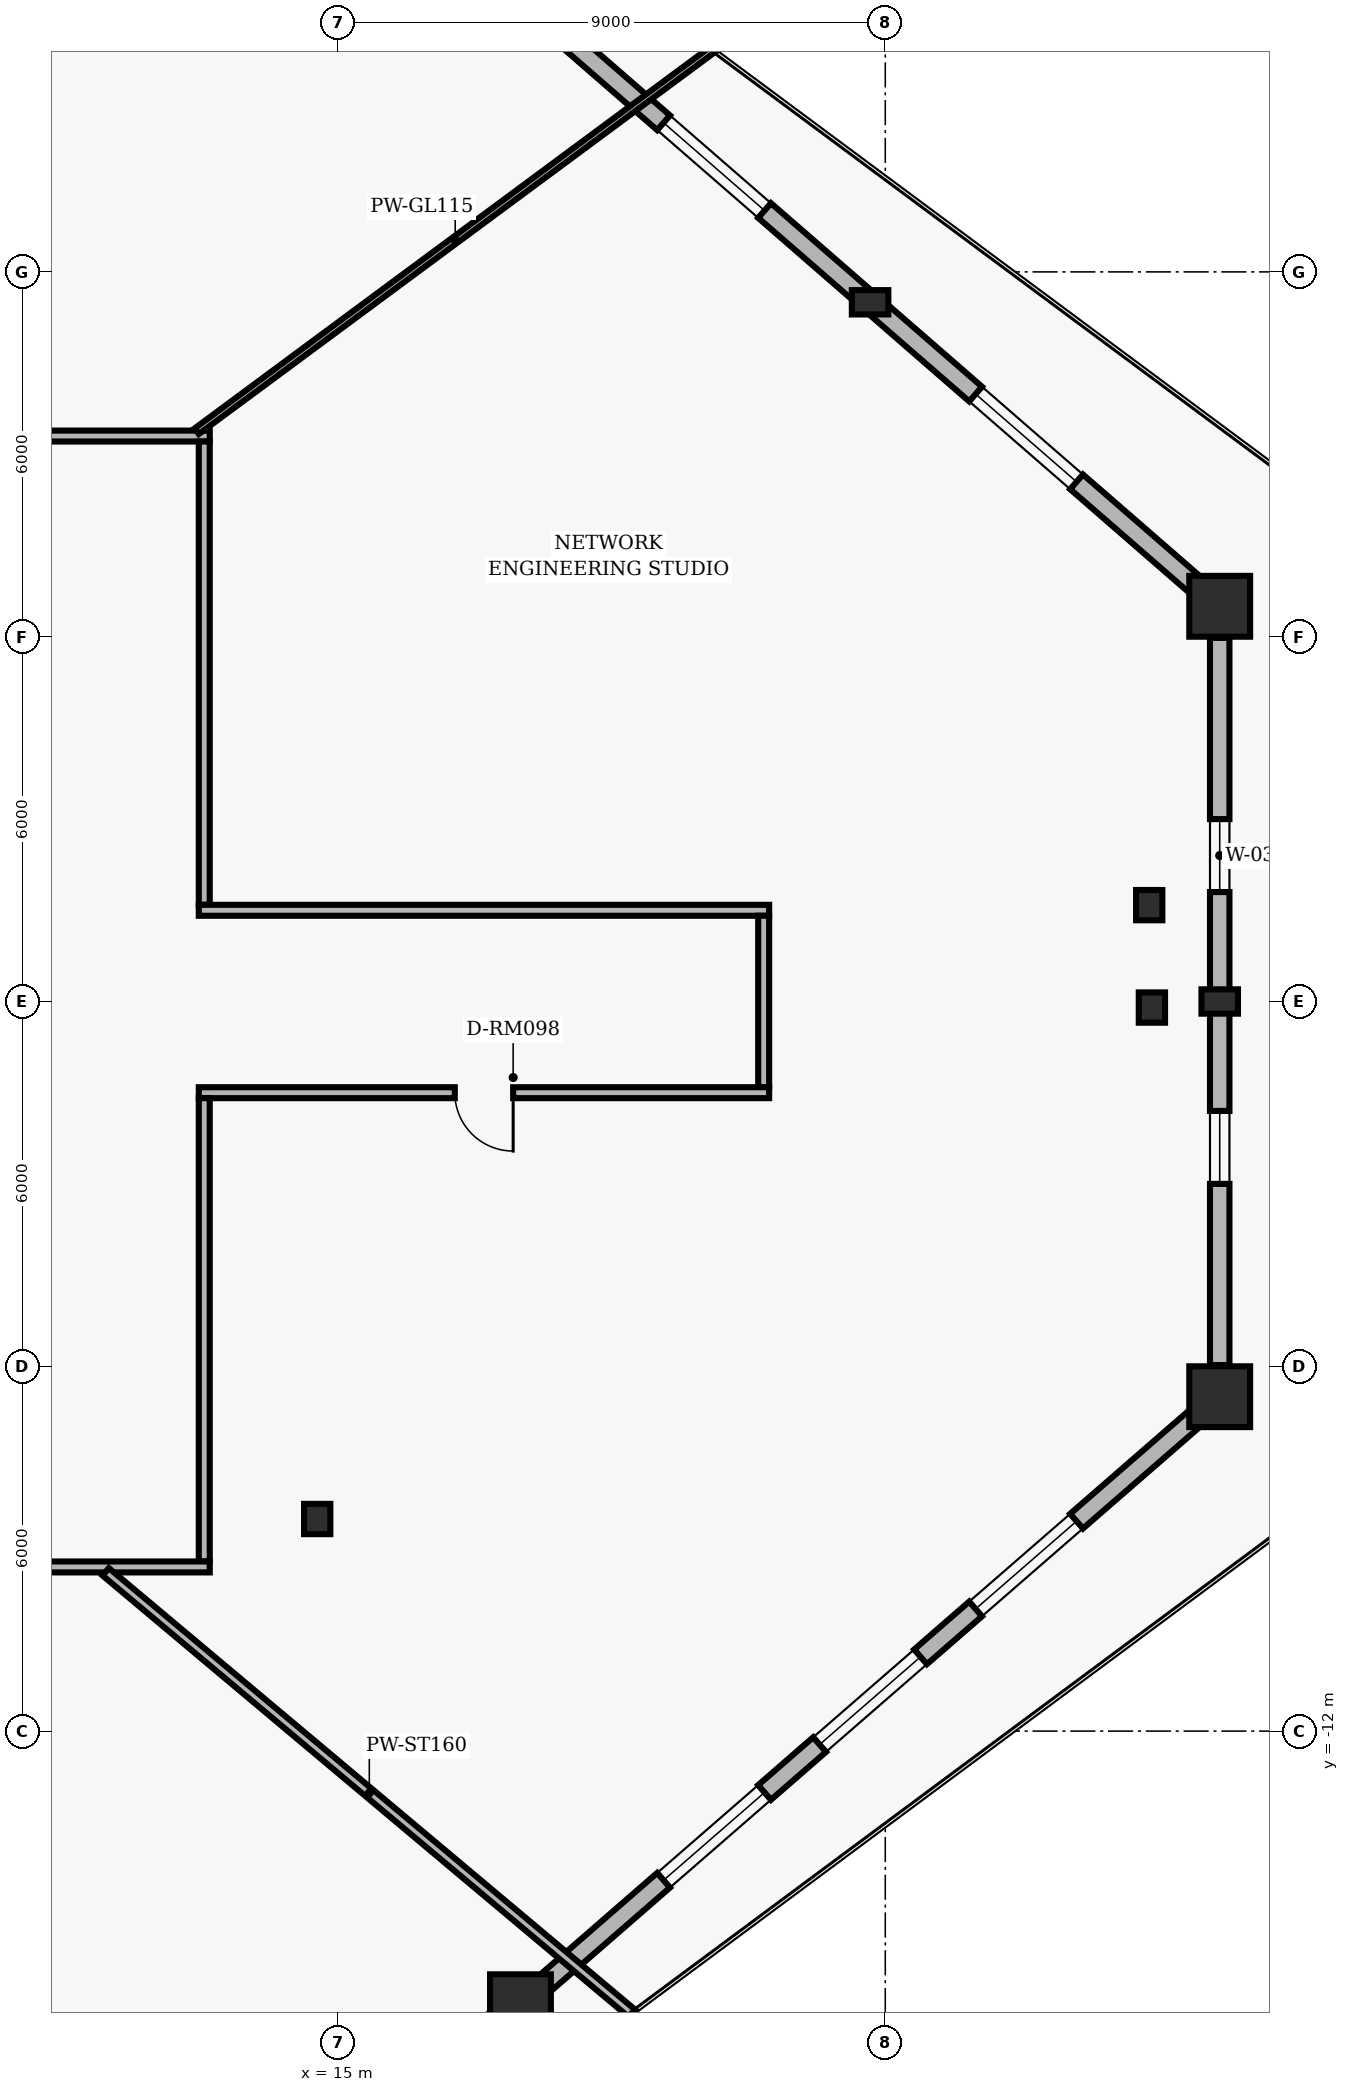
"""IFC4 building model, lengths in metres.
Left out: names, types, materials, properties, quantities, classifications, styles, units other than length and angle.
Written with IfcOpenShell. Run it as: python <this file> out.ifc"""

import sys

from ifc_helpers import new_model, si_unit, direction, frame, frame_2d, origin, origin_2d, place, context, subcontext, project, spatial, rectangle, i_section, extrude, element, fill, save


model = new_model("IFC4")
c1 = context("Model", 3, precision=1e-05, world=origin(), true_north=direction((0.0, 1.0)))
c2 = subcontext(c1, "Body", "Model", "MODEL_VIEW")
j1 = project(units=[si_unit("LENGTHUNIT", "METRE"), si_unit("PLANEANGLEUNIT", "RADIAN")], contexts=[c1])
p1 = place(None, origin())
s1 = spatial("IfcSite", under=j1, at=p1, CompositionType="ELEMENT")
p2 = place(p1, origin())
s2 = spatial("IfcBuilding", under=s1, at=p2, CompositionType="ELEMENT")
p3 = place(p2, frame((0.0, 0.0, 8.32)))
s3 = spatial("IfcBuildingStorey", under=s2, at=p3, CompositionType="ELEMENT", Elevation=8.32)
for number, where, z_axis, x_axis in (
    (1, (18.0, -16.5, 0.0), (0.0, 0.0, 1.0), (1.0, 0.0, 0.0)),
    (2, (29.5, -6.5, 0.0), (0.0, 0.0, 1.0), (1.0, 0.0, 0.0)),
    (3, (29.5, 6.5, 0.0), (0.0, 0.0, 1.0), (1.0, 0.0, 0.0)),
):
    element("IfcColumn", number, at=place(p3, frame(where, z_axis=z_axis, x_axis=x_axis)), inside=s3, PredefinedType="COLUMN", context=c2, shape_type="SweptSolid", body=[
        extrude(rectangle(XDim=1.0, YDim=1.0, at=origin_2d()), origin(), (0.0, 0.0, 1.0), 3.52),
    ])
for number, where, z_axis, x_axis in (
    (4, (28.341, 1.585, 0.0), (0.0, 0.0, 1.0), (1.0, 0.0, 0.0)),
    (5, (14.657, -8.512, 0.0), (0.0, 0.0, 1.0), (1.0, 0.0, 0.0)),
    (6, (28.385, -0.1, 0.0), (0.0, 0.0, 1.0), (1.0, 0.0, 0.0)),
):
    element("IfcColumn", number, at=place(p3, frame(where, z_axis=z_axis, x_axis=x_axis)), inside=s3, PredefinedType="COLUMN", context=c2, shape_type="SweptSolid", body=[
        extrude(i_section(OverallWidth=0.432, OverallDepth=0.498, WebThickness=0.056, FlangeThickness=0.089, FilletRadius=0.025, at=origin_2d()), origin(), (0.0, 0.0, 1.0), 3.52),
    ])
for number, where, z_axis, x_axis in (
    (7, (29.5, 0.0, 0.0), (0.0, 0.0, 1.0), (1.0, 0.0, 0.0)),
    (8, (23.75, 11.5, 0.0), (0.0, 0.0, 1.0), (1.0, 0.0, 0.0)),
):
    element("IfcColumn", number, at=place(p3, frame(where, z_axis=z_axis, x_axis=x_axis)), inside=s3, PredefinedType="PILASTER", context=c2, shape_type="SweptSolid", body=[
        extrude(rectangle(XDim=0.6, YDim=0.4, at=origin_2d()), origin(), (0.0, 0.0, 1.0), 3.52),
    ])
p4 = place(p3, frame((29.108, -6.841, 0.0), z_axis=(0.0, 0.0, 1.0), x_axis=(-0.754615886195, -0.656166796098, 0.0)))
e9 = element("IfcWall", 9, at=p4, inside=s3, PredefinedType="SOLIDWALL", context=c2, shape_type="SweptSolid", body=[
    extrude(rectangle(XDim=14.2, YDim=0.32, at=frame_2d((7.1, 0.0))), origin(), (0.0, 0.0, 1.0), 2.261),
])
p5 = place(p4, frame((2.6, 0.0, 0.4)))
e10 = element("IfcOpeningElement", 10, at=p5, cuts=e9, PredefinedType="OPENING", context=c2, shape_type="SweptSolid", body=[
    extrude(rectangle(XDim=2.2, YDim=1.1, at=frame_2d((1.1, 0.55))), frame((0.0, 0.17, 0.0), z_axis=(0.0, -1.0, 0.0), x_axis=(1.0, 0.0, 0.0)), (0.0, 0.0, 1.0), 0.34),
])
p6 = place(p4, frame((6.0, 0.0, 0.4)))
e11 = element("IfcOpeningElement", 11, at=p6, cuts=e9, PredefinedType="OPENING", context=c2, shape_type="SweptSolid", body=[
    extrude(rectangle(XDim=2.2, YDim=1.1, at=frame_2d((1.1, 0.55))), frame((0.0, 0.17, 0.0), z_axis=(0.0, -1.0, 0.0), x_axis=(1.0, 0.0, 0.0)), (0.0, 0.0, 1.0), 0.34),
])
p7 = place(p4, frame((9.4, 0.0, 0.4)))
e12 = element("IfcOpeningElement", 12, at=p7, cuts=e9, PredefinedType="OPENING", context=c2, shape_type="SweptSolid", body=[
    extrude(rectangle(XDim=2.2, YDim=1.1, at=frame_2d((1.1, 0.55))), frame((0.0, 0.17, 0.0), z_axis=(0.0, -1.0, 0.0), x_axis=(1.0, 0.0, 0.0)), (0.0, 0.0, 1.0), 0.34),
])
p8 = place(p3, frame((29.5, 5.98, 0.0), z_axis=(0.0, 0.0, 1.0), x_axis=(0.0, -1.0, 0.0)))
e13 = element("IfcWall", 13, at=p8, inside=s3, PredefinedType="SOLIDWALL", context=c2, shape_type="SweptSolid", body=[
    extrude(rectangle(XDim=11.96, YDim=0.32, at=frame_2d((5.98, 0.0))), origin(), (0.0, 0.0, 1.0), 2.588),
])
p9 = place(p8, frame((2.98, 0.0, 0.65)))
e14 = element("IfcOpeningElement", 14, at=p9, cuts=e13, PredefinedType="OPENING", context=c2, shape_type="SweptSolid", body=[
    extrude(rectangle(XDim=1.2, YDim=1.6, at=frame_2d((0.6, 0.8))), frame((0.0, 0.17, 0.0), z_axis=(0.0, -1.0, 0.0), x_axis=(1.0, 0.0, 0.0)), (0.0, 0.0, 1.0), 0.34),
])
p10 = place(p8, frame((7.78, 0.0, 0.65)))
e15 = element("IfcOpeningElement", 15, at=p10, cuts=e13, PredefinedType="OPENING", context=c2, shape_type="SweptSolid", body=[
    extrude(rectangle(XDim=1.2, YDim=1.6, at=frame_2d((0.6, 0.8))), frame((0.0, 0.17, 0.0), z_axis=(0.0, -1.0, 0.0), x_axis=(1.0, 0.0, 0.0)), (0.0, 0.0, 1.0), 0.34),
])
p11 = place(p3, frame((18.392, 16.159, 0.0), z_axis=(0.0, 0.0, 1.0), x_axis=(0.754615886195, -0.656166796098, 0.0)))
e16 = element("IfcWall", 16, at=p11, inside=s3, PredefinedType="SOLIDWALL", context=c2, shape_type="SweptSolid", body=[
    extrude(rectangle(XDim=14.2, YDim=0.32, at=frame_2d((7.1, 0.0))), origin(), (0.0, 0.0, 1.0), 2.261),
])
p12 = place(p11, frame((2.6, 0.0, 0.65)))
e17 = element("IfcOpeningElement", 17, at=p12, cuts=e16, PredefinedType="OPENING", context=c2, shape_type="SweptSolid", body=[
    extrude(rectangle(XDim=2.2, YDim=1.1, at=frame_2d((1.1, 0.55))), frame((0.0, 0.17, 0.0), z_axis=(0.0, -1.0, 0.0), x_axis=(1.0, 0.0, 0.0)), (0.0, 0.0, 1.0), 0.34),
])
p13 = place(p11, frame((9.4, 0.0, 0.65)))
e18 = element("IfcOpeningElement", 18, at=p13, cuts=e16, PredefinedType="OPENING", context=c2, shape_type="SweptSolid", body=[
    extrude(rectangle(XDim=2.2, YDim=1.1, at=frame_2d((1.1, 0.55))), frame((0.0, 0.17, 0.0), z_axis=(0.0, -1.0, 0.0), x_axis=(1.0, 0.0, 0.0)), (0.0, 0.0, 1.0), 0.34),
])
p14 = place(p3, frame((-12.89, 9.3, 0.0), z_axis=(0.0, 0.0, 1.0), x_axis=(1.0, 0.0, 0.0)))
e19 = element("IfcWall", 19, at=p14, inside=s3, PredefinedType="PARTITIONING", context=c2, shape_type="SweptSolid", body=[
    extrude(rectangle(XDim=25.78, YDim=0.18, at=frame_2d((12.89, 0.0))), origin(), (0.0, 0.0, 1.0), 2.76),
])
p15 = place(p14, frame((17.202, 0.0, 0.0)))
e20 = element("IfcOpeningElement", 20, at=p15, cuts=e19, PredefinedType="OPENING", context=c2, shape_type="SweptSolid", body=[
    extrude(rectangle(XDim=0.96, YDim=2.02, at=frame_2d((0.48, 1.01))), frame((0.0, 0.1, 0.0), z_axis=(0.0, -1.0, 0.0), x_axis=(1.0, 0.0, 0.0)), (0.0, 0.0, 1.0), 0.2),
])
p16 = place(p14, frame((4.539, 0.0, 0.0)))
e21 = element("IfcOpeningElement", 21, at=p16, cuts=e19, PredefinedType="OPENING", context=c2, shape_type="SweptSolid", body=[
    extrude(rectangle(XDim=1.02, YDim=2.02, at=frame_2d((0.51, 1.01))), frame((0.0, 0.1, 0.0), z_axis=(0.0, -1.0, 0.0), x_axis=(1.0, 0.0, 0.0)), (0.0, 0.0, 1.0), 0.2),
])
p17 = place(p3, frame((12.8, 9.21, 0.0), z_axis=(0.0, 0.0, 1.0), x_axis=(0.0, -1.0, 0.0)))
e22 = element("IfcWall", 22, at=p17, inside=s3, PredefinedType="PARTITIONING", context=c2, shape_type="SweptSolid", body=[
    extrude(rectangle(XDim=7.62, YDim=0.18, at=frame_2d((3.81, 0.0))), origin(), (0.0, 0.0, 1.0), 3.193),
])
p18 = place(p3, frame((12.71, 1.5, 0.0), z_axis=(0.0, 0.0, 1.0), x_axis=(1.0, 0.0, 0.0)))
e23 = element("IfcWall", 23, at=p18, inside=s3, PredefinedType="PARTITIONING", context=c2, shape_type="SweptSolid", body=[
    extrude(rectangle(XDim=9.38, YDim=0.18, at=frame_2d((4.69, 0.0))), origin(), (0.0, 0.0, 1.0), 3.193),
])
p19 = place(p3, frame((22.0, 1.41, 0.0), z_axis=(0.0, 0.0, 1.0), x_axis=(0.0, -1.0, 0.0)))
e24 = element("IfcWall", 24, at=p19, inside=s3, PredefinedType="PARTITIONING", context=c2, shape_type="SweptSolid", body=[
    extrude(rectangle(XDim=2.82, YDim=0.18, at=frame_2d((1.41, 0.0))), origin(), (0.0, 0.0, 1.0), 3.193),
])
p20 = place(p3, frame((22.09, -1.5, 0.0), z_axis=(0.0, 0.0, 1.0), x_axis=(-1.0, 0.0, 0.0)))
e25 = element("IfcWall", 25, at=p20, inside=s3, PredefinedType="PARTITIONING", context=c2, shape_type="SweptSolid", body=[
    extrude(rectangle(XDim=9.38, YDim=0.18, at=frame_2d((4.69, 0.0))), origin(), (0.0, 0.0, 1.0), 3.193),
])
p21 = place(p20, frame((4.21, 0.0, 0.0)))
e26 = element("IfcOpeningElement", 26, at=p21, cuts=e25, PredefinedType="OPENING", context=c2, shape_type="SweptSolid", body=[
    extrude(rectangle(XDim=0.96, YDim=2.02, at=frame_2d((0.48, 1.01))), frame((0.0, 0.1, 0.0), z_axis=(0.0, -1.0, 0.0), x_axis=(1.0, 0.0, 0.0)), (0.0, 0.0, 1.0), 0.2),
])
p22 = place(p3, frame((12.8, -1.59, 0.0), z_axis=(0.0, 0.0, 1.0), x_axis=(0.0, -1.0, 0.0)))
e27 = element("IfcWall", 27, at=p22, inside=s3, PredefinedType="PARTITIONING", context=c2, shape_type="SweptSolid", body=[
    extrude(rectangle(XDim=7.62, YDim=0.18, at=frame_2d((3.81, 0.0))), origin(), (0.0, 0.0, 1.0), 3.193),
])
p23 = place(p3, frame((12.89, -9.3, 0.0), z_axis=(0.0, 0.0, 1.0), x_axis=(-1.0, 0.0, 0.0)))
e28 = element("IfcWall", 28, at=p23, inside=s3, PredefinedType="PARTITIONING", context=c2, shape_type="SweptSolid", body=[
    extrude(rectangle(XDim=25.78, YDim=0.18, at=frame_2d((12.89, 0.0))), origin(), (0.0, 0.0, 1.0), 2.76),
])
p24 = place(p23, frame((9.254, 0.0, 0.0)))
e29 = element("IfcOpeningElement", 29, at=p24, cuts=e28, PredefinedType="OPENING", context=c2, shape_type="SweptSolid", body=[
    extrude(rectangle(XDim=1.02, YDim=2.02, at=frame_2d((0.51, 1.01))), frame((0.0, 0.1, 0.0), z_axis=(0.0, -1.0, 0.0), x_axis=(1.0, 0.0, 0.0)), (0.0, 0.0, 1.0), 0.2),
])
p25 = place(p3, frame((11.179, -9.38, 0.0), z_axis=(0.0, 0.0, 1.0), x_axis=(0.766037025887, -0.642796449095, 0.0)))
e30 = element("IfcWall", 30, at=p25, inside=s3, PredefinedType="PARTITIONING", context=c2, shape_type="SweptSolid", body=[
    extrude(rectangle(XDim=11.32, YDim=0.16, at=frame_2d((5.66, 0.0))), origin(), (0.0, 0.0, 1.0), 2.246),
])
p26 = place(p3, frame((12.676, 9.38, 0.0), z_axis=(0.0, 0.0, 1.0), x_axis=(0.803850730109, 0.594831071568, 0.0)))
e31 = element("IfcWall", 31, at=p26, inside=s3, PredefinedType="MOVABLE", context=c2, shape_type="SweptSolid", body=[
    extrude(rectangle(XDim=10.575, YDim=0.115, at=frame_2d((5.288, 0.0))), origin(), (0.0, 0.0, 1.0), 2.246),
])
p27 = place(p5, origin())
e32 = element("IfcWindow", 32, at=p27, inside=s3, PartitioningType="SINGLE_PANEL", PredefinedType="WINDOW", context=c2, shape_type="SweptSolid", body=[
    extrude(rectangle(XDim=2.2, YDim=1.1, at=frame_2d((1.1, 0.55))), frame((0.0, 0.03, 0.0), z_axis=(0.0, -1.0, 0.0), x_axis=(1.0, 0.0, 0.0)), (0.0, 0.0, 1.0), 0.06),
])
fill(e10, e32)
p28 = place(p6, origin())
e33 = element("IfcWindow", 33, at=p28, inside=s3, PartitioningType="SINGLE_PANEL", PredefinedType="WINDOW", context=c2, shape_type="SweptSolid", body=[
    extrude(rectangle(XDim=2.2, YDim=1.1, at=frame_2d((1.1, 0.55))), frame((0.0, 0.03, 0.0), z_axis=(0.0, -1.0, 0.0), x_axis=(1.0, 0.0, 0.0)), (0.0, 0.0, 1.0), 0.06),
])
fill(e11, e33)
p29 = place(p7, origin())
e34 = element("IfcWindow", 34, at=p29, inside=s3, PartitioningType="SINGLE_PANEL", PredefinedType="WINDOW", context=c2, shape_type="SweptSolid", body=[
    extrude(rectangle(XDim=2.2, YDim=1.1, at=frame_2d((1.1, 0.55))), frame((0.0, 0.03, 0.0), z_axis=(0.0, -1.0, 0.0), x_axis=(1.0, 0.0, 0.0)), (0.0, 0.0, 1.0), 0.06),
])
fill(e12, e34)
p30 = place(p9, origin())
e35 = element("IfcWindow", 35, at=p30, inside=s3, PartitioningType="SINGLE_PANEL", PredefinedType="WINDOW", context=c2, shape_type="SweptSolid", body=[
    extrude(rectangle(XDim=1.2, YDim=1.6, at=frame_2d((0.6, 0.8))), frame((0.0, 0.03, 0.0), z_axis=(0.0, -1.0, 0.0), x_axis=(1.0, 0.0, 0.0)), (0.0, 0.0, 1.0), 0.06),
])
fill(e14, e35)
p31 = place(p10, origin())
e36 = element("IfcWindow", 36, at=p31, inside=s3, PartitioningType="SINGLE_PANEL", PredefinedType="WINDOW", context=c2, shape_type="SweptSolid", body=[
    extrude(rectangle(XDim=1.2, YDim=1.6, at=frame_2d((0.6, 0.8))), frame((0.0, 0.03, 0.0), z_axis=(0.0, -1.0, 0.0), x_axis=(1.0, 0.0, 0.0)), (0.0, 0.0, 1.0), 0.06),
])
fill(e15, e36)
p32 = place(p12, origin())
e37 = element("IfcWindow", 37, at=p32, inside=s3, PartitioningType="SINGLE_PANEL", PredefinedType="WINDOW", context=c2, shape_type="SweptSolid", body=[
    extrude(rectangle(XDim=2.2, YDim=1.1, at=frame_2d((1.1, 0.55))), frame((0.0, 0.03, 0.0), z_axis=(0.0, -1.0, 0.0), x_axis=(1.0, 0.0, 0.0)), (0.0, 0.0, 1.0), 0.06),
])
fill(e17, e37)
p33 = place(p13, origin())
e38 = element("IfcWindow", 38, at=p33, inside=s3, PartitioningType="SINGLE_PANEL", PredefinedType="WINDOW", context=c2, shape_type="SweptSolid", body=[
    extrude(rectangle(XDim=2.2, YDim=1.1, at=frame_2d((1.1, 0.55))), frame((0.0, 0.03, 0.0), z_axis=(0.0, -1.0, 0.0), x_axis=(1.0, 0.0, 0.0)), (0.0, 0.0, 1.0), 0.06),
])
fill(e18, e38)
p34 = place(p21, origin())
e39 = element("IfcDoor", 39, at=p34, inside=s3, OperationType="SINGLE_SWING_LEFT", PredefinedType="DOOR", context=c2, shape_type="SweptSolid", body=[
    extrude(rectangle(XDim=0.96, YDim=2.02, at=frame_2d((0.48, 1.01))), frame((0.0, 0.025, 0.0), z_axis=(0.0, -1.0, 0.0), x_axis=(1.0, 0.0, 0.0)), (0.0, 0.0, 1.0), 0.05),
])
fill(e26, e39)
save(model, sys.argv[1])
